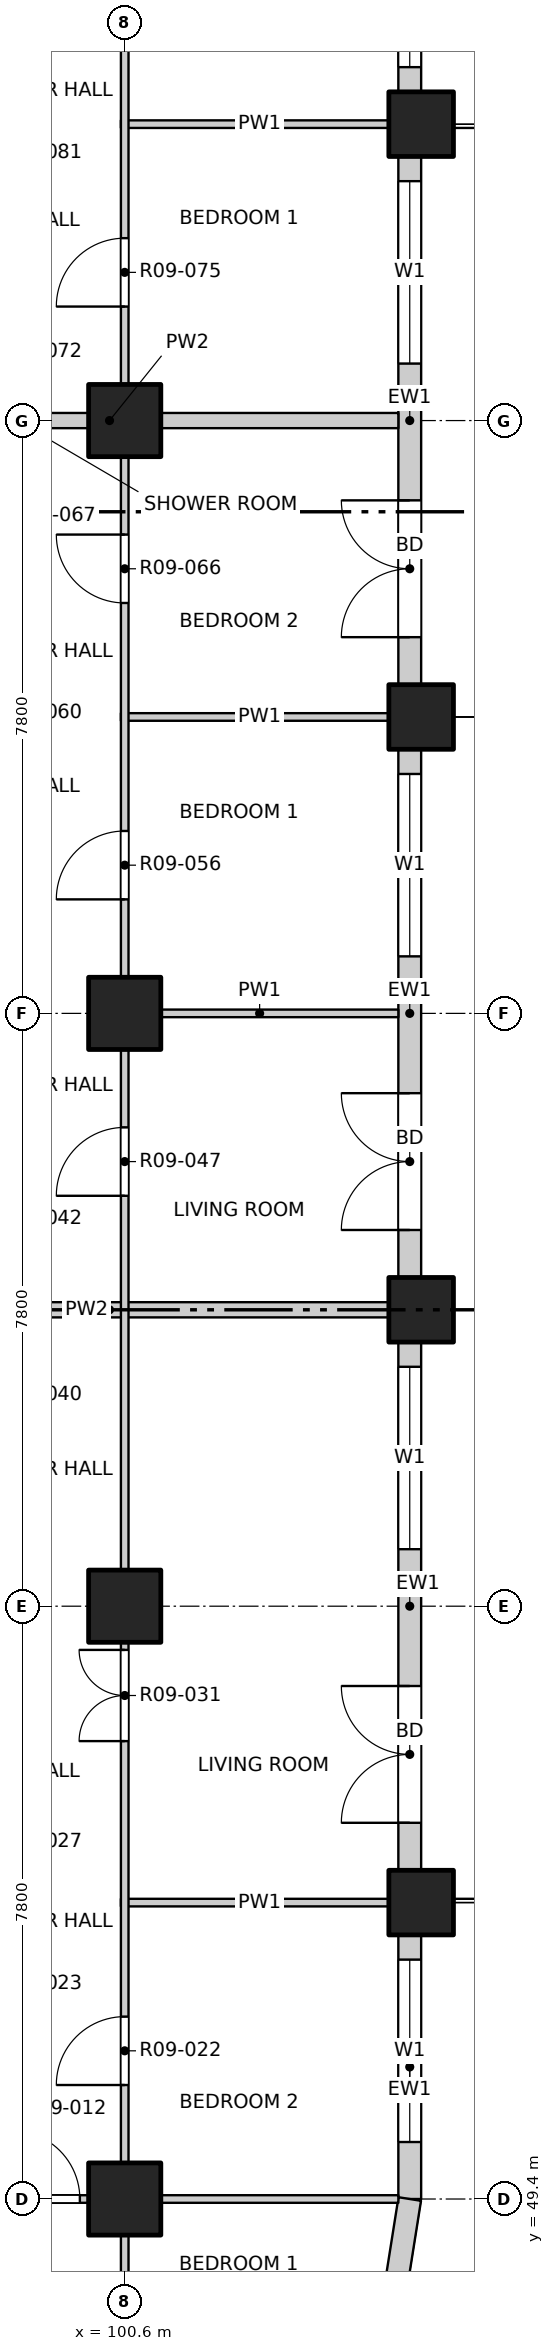
"""IFC4 building model, lengths in metres.
Left out: names, types, materials, properties, quantities, classifications, styles, units other than length and angle.
Written with IfcOpenShell. Run it as: python <this file> out.ifc"""

import sys

from ifc_helpers import new_model, si_unit, direction, frame, frame_2d, origin, origin_2d, place, context, subcontext, project, spatial, rectangle, extrude, element, fill, save


model = new_model("IFC4")
c1 = context("Model", 3, precision=1e-05, world=origin(), true_north=direction((0.0, 1.0)))
c2 = subcontext(c1, "Body", "Model", "MODEL_VIEW")
j1 = project(units=[si_unit("LENGTHUNIT", "METRE"), si_unit("PLANEANGLEUNIT", "RADIAN")], contexts=[c1])
p1 = place(None, origin())
s1 = spatial("IfcSite", under=j1, at=p1, CompositionType="ELEMENT")
p2 = place(p1, origin())
s2 = spatial("IfcBuilding", under=s1, at=p2, CompositionType="ELEMENT")
p3 = place(p2, frame((0.0, 0.0, 110.1)))
s3 = spatial("IfcBuildingStorey", under=s2, at=p3, CompositionType="ELEMENT", Elevation=110.1)
for number, where, z_axis, x_axis in (
    (1, (104.5, 53.3, -0.25), (0.0, 0.0, 1.0), (1.0, 0.0, 0.0)),
    (2, (104.5, 61.1, -0.25), (0.0, 0.0, 1.0), (1.0, 0.0, 0.0)),
    (3, (104.5, 68.9, -0.25), (0.0, 0.0, 1.0), (1.0, 0.0, 0.0)),
    (4, (104.5, 76.7, -0.25), (0.0, 0.0, 1.0), (1.0, 0.0, 0.0)),
):
    element("IfcColumn", number, at=place(p3, frame(where, z_axis=z_axis, x_axis=x_axis)), inside=s3, PredefinedType="COLUMN", context=c2, shape_type="SweptSolid", body=[
        extrude(rectangle(XDim=0.85, YDim=0.85, at=origin_2d()), origin(), (0.0, 0.0, 1.0), 3.4),
    ])
for number, where, z_axis, x_axis in (
    (5, (100.6, 49.4, -0.25), (0.0, 0.0, 1.0), (1.0, 0.0, 0.0)),
    (6, (100.6, 57.2, -0.25), (0.0, 0.0, 1.0), (1.0, 0.0, 0.0)),
    (7, (100.6, 65.0, -0.25), (0.0, 0.0, 1.0), (1.0, 0.0, 0.0)),
    (8, (100.6, 72.8, -0.25), (0.0, 0.0, 1.0), (1.0, 0.0, 0.0)),
):
    element("IfcColumn", number, at=place(p3, frame(where, z_axis=z_axis, x_axis=x_axis)), inside=s3, PredefinedType="COLUMN", context=c2, shape_type="SweptSolid", body=[
        extrude(rectangle(XDim=0.95, YDim=0.95, at=origin_2d()), origin(), (0.0, 0.0, 1.0), 3.4),
    ])
p4 = place(p3, frame((104.35, 49.4, 0.0), z_axis=(0.0, 0.0, 1.0), x_axis=(0.0, 1.0, 0.0)))
e9 = element("IfcWall", 9, at=p4, inside=s3, PredefinedType="SOLIDWALL", context=c2, shape_type="SweptSolid", body=[
    extrude(rectangle(XDim=3.475, YDim=0.3, at=frame_2d((1.738, 0.0))), origin(), (0.0, 0.0, 1.0), 2.7),
])
p5 = place(p4, frame((0.75, 0.0, 0.9)))
e10 = element("IfcOpeningElement", 10, at=p5, cuts=e9, PredefinedType="OPENING", context=c2, shape_type="SweptSolid", body=[
    extrude(rectangle(XDim=2.4, YDim=1.8, at=frame_2d((1.2, 0.9))), frame((0.0, 0.16, 0.0), z_axis=(0.0, -1.0, 0.0), x_axis=(1.0, 0.0, 0.0)), (0.0, 0.0, 1.0), 0.32),
])
p6 = place(p3, frame((104.35, 53.725, 0.0), z_axis=(0.0, 0.0, 1.0), x_axis=(0.0, 1.0, 0.0)))
e11 = element("IfcWall", 11, at=p6, inside=s3, PredefinedType="SOLIDWALL", context=c2, shape_type="SweptSolid", body=[
    extrude(rectangle(XDim=6.95, YDim=0.3, at=frame_2d((3.475, 0.0))), origin(), (0.0, 0.0, 1.0), 2.7),
])
p7 = place(p6, frame((0.625, 0.0, 0.0)))
e12 = element("IfcOpeningElement", 12, at=p7, cuts=e11, PredefinedType="OPENING", context=c2, shape_type="SweptSolid", body=[
    extrude(rectangle(XDim=1.8, YDim=2.4, at=frame_2d((0.9, 1.2))), frame((0.0, 0.16, 0.0), z_axis=(0.0, -1.0, 0.0), x_axis=(1.0, 0.0, 0.0)), (0.0, 0.0, 1.0), 0.32),
])
p8 = place(p6, frame((4.225, 0.0, 0.9)))
e13 = element("IfcOpeningElement", 13, at=p8, cuts=e11, PredefinedType="OPENING", context=c2, shape_type="SweptSolid", body=[
    extrude(rectangle(XDim=2.4, YDim=1.8, at=frame_2d((1.2, 0.9))), frame((0.0, 0.16, 0.0), z_axis=(0.0, -1.0, 0.0), x_axis=(1.0, 0.0, 0.0)), (0.0, 0.0, 1.0), 0.32),
])
p9 = place(p3, frame((104.35, 61.525, 0.0), z_axis=(0.0, 0.0, 1.0), x_axis=(0.0, 1.0, 0.0)))
e14 = element("IfcWall", 14, at=p9, inside=s3, PredefinedType="SOLIDWALL", context=c2, shape_type="SweptSolid", body=[
    extrude(rectangle(XDim=6.95, YDim=0.3, at=frame_2d((3.475, 0.0))), origin(), (0.0, 0.0, 1.0), 2.7),
])
p10 = place(p9, frame((0.625, 0.0, 0.0)))
e15 = element("IfcOpeningElement", 15, at=p10, cuts=e14, PredefinedType="OPENING", context=c2, shape_type="SweptSolid", body=[
    extrude(rectangle(XDim=1.8, YDim=2.4, at=frame_2d((0.9, 1.2))), frame((0.0, 0.16, 0.0), z_axis=(0.0, -1.0, 0.0), x_axis=(1.0, 0.0, 0.0)), (0.0, 0.0, 1.0), 0.32),
])
p11 = place(p9, frame((4.225, 0.0, 0.9)))
e16 = element("IfcOpeningElement", 16, at=p11, cuts=e14, PredefinedType="OPENING", context=c2, shape_type="SweptSolid", body=[
    extrude(rectangle(XDim=2.4, YDim=1.8, at=frame_2d((1.2, 0.9))), frame((0.0, 0.16, 0.0), z_axis=(0.0, -1.0, 0.0), x_axis=(1.0, 0.0, 0.0)), (0.0, 0.0, 1.0), 0.32),
])
p12 = place(p3, frame((104.35, 69.325, 0.0), z_axis=(0.0, 0.0, 1.0), x_axis=(0.0, 1.0, 0.0)))
e17 = element("IfcWall", 17, at=p12, inside=s3, PredefinedType="SOLIDWALL", context=c2, shape_type="SweptSolid", body=[
    extrude(rectangle(XDim=6.95, YDim=0.3, at=frame_2d((3.475, 0.0))), origin(), (0.0, 0.0, 1.0), 2.7),
])
p13 = place(p12, frame((0.625, 0.0, 0.0)))
e18 = element("IfcOpeningElement", 18, at=p13, cuts=e17, PredefinedType="OPENING", context=c2, shape_type="SweptSolid", body=[
    extrude(rectangle(XDim=1.8, YDim=2.4, at=frame_2d((0.9, 1.2))), frame((0.0, 0.16, 0.0), z_axis=(0.0, -1.0, 0.0), x_axis=(1.0, 0.0, 0.0)), (0.0, 0.0, 1.0), 0.32),
])
p14 = place(p12, frame((4.225, 0.0, 0.9)))
e19 = element("IfcOpeningElement", 19, at=p14, cuts=e17, PredefinedType="OPENING", context=c2, shape_type="SweptSolid", body=[
    extrude(rectangle(XDim=2.4, YDim=1.8, at=frame_2d((1.2, 0.9))), frame((0.0, 0.16, 0.0), z_axis=(0.0, -1.0, 0.0), x_axis=(1.0, 0.0, 0.0)), (0.0, 0.0, 1.0), 0.32),
])
p15 = place(p3, frame((104.35, 77.125, 0.0), z_axis=(0.0, 0.0, 1.0), x_axis=(0.0, 1.0, 0.0)))
e20 = element("IfcWall", 20, at=p15, inside=s3, PredefinedType="SOLIDWALL", context=c2, shape_type="SweptSolid", body=[
    extrude(rectangle(XDim=3.475, YDim=0.3, at=frame_2d((1.738, 0.0))), origin(), (0.0, 0.0, 1.0), 2.7),
])
p16 = place(p15, frame((0.325, 0.0, 0.9)))
e21 = element("IfcOpeningElement", 21, at=p16, cuts=e20, PredefinedType="OPENING", context=c2, shape_type="SweptSolid", body=[
    extrude(rectangle(XDim=2.4, YDim=1.8, at=frame_2d((1.2, 0.9))), frame((0.0, 0.16, 0.0), z_axis=(0.0, -1.0, 0.0), x_axis=(1.0, 0.0, 0.0)), (0.0, 0.0, 1.0), 0.32),
])
p17 = place(p3, frame((104.167, 48.241, 0.0), z_axis=(0.0, 0.0, 1.0), x_axis=(0.156496880861, 0.987678452879, 0.0)))
e22 = element("IfcWall", 22, at=p17, inside=s3, PredefinedType="SOLIDWALL", context=c2, shape_type="SweptSolid", body=[
    extrude(rectangle(XDim=1.173, YDim=0.3, at=frame_2d((0.586, 0.0))), origin(), (0.0, 0.0, 1.0), 2.7),
])
p18 = place(p3, frame((65.8, 49.4, 0.0), z_axis=(0.0, 0.0, 1.0), x_axis=(1.0, 0.0, 0.0)))
e23 = element("IfcWall", 23, at=p18, inside=s3, PredefinedType="PARTITIONING", context=c2, shape_type="SweptSolid", body=[
    extrude(rectangle(XDim=38.4, YDim=0.1, at=frame_2d((19.2, 0.0))), origin(), (0.0, 0.0, 1.0), 3.15),
])
p19 = place(p18, frame((4.19, 0.0, 0.0)))
e24 = element("IfcOpeningElement", 24, at=p19, cuts=e23, PredefinedType="OPENING", context=c2, shape_type="SweptSolid", body=[
    extrude(rectangle(XDim=0.9, YDim=2.1, at=frame_2d((0.45, 1.05))), frame((0.0, 0.06, 0.0), z_axis=(0.0, -1.0, 0.0), x_axis=(1.0, 0.0, 0.0)), (0.0, 0.0, 1.0), 0.12),
])
p20 = place(p18, frame((9.0, 0.0, 0.0)))
e25 = element("IfcOpeningElement", 25, at=p20, cuts=e23, PredefinedType="OPENING", context=c2, shape_type="SweptSolid", body=[
    extrude(rectangle(XDim=0.9, YDim=2.1, at=frame_2d((0.45, 1.05))), frame((0.0, 0.06, 0.0), z_axis=(0.0, -1.0, 0.0), x_axis=(1.0, 0.0, 0.0)), (0.0, 0.0, 1.0), 0.12),
])
p21 = place(p18, frame((12.9, 0.0, 0.0)))
e26 = element("IfcOpeningElement", 26, at=p21, cuts=e23, PredefinedType="OPENING", context=c2, shape_type="SweptSolid", body=[
    extrude(rectangle(XDim=0.9, YDim=2.1, at=frame_2d((0.45, 1.05))), frame((0.0, 0.06, 0.0), z_axis=(0.0, -1.0, 0.0), x_axis=(1.0, 0.0, 0.0)), (0.0, 0.0, 1.0), 0.12),
])
p22 = place(p18, frame((16.8, 0.0, 0.0)))
e27 = element("IfcOpeningElement", 27, at=p22, cuts=e23, PredefinedType="OPENING", context=c2, shape_type="SweptSolid", body=[
    extrude(rectangle(XDim=0.9, YDim=2.1, at=frame_2d((0.45, 1.05))), frame((0.0, 0.06, 0.0), z_axis=(0.0, -1.0, 0.0), x_axis=(1.0, 0.0, 0.0)), (0.0, 0.0, 1.0), 0.12),
])
p23 = place(p18, frame((20.7, 0.0, 0.0)))
e28 = element("IfcOpeningElement", 28, at=p23, cuts=e23, PredefinedType="OPENING", context=c2, shape_type="SweptSolid", body=[
    extrude(rectangle(XDim=0.9, YDim=2.1, at=frame_2d((0.45, 1.05))), frame((0.0, 0.06, 0.0), z_axis=(0.0, -1.0, 0.0), x_axis=(1.0, 0.0, 0.0)), (0.0, 0.0, 1.0), 0.12),
])
p24 = place(p18, frame((24.6, 0.0, 0.0)))
e29 = element("IfcOpeningElement", 29, at=p24, cuts=e23, PredefinedType="OPENING", context=c2, shape_type="SweptSolid", body=[
    extrude(rectangle(XDim=0.9, YDim=2.1, at=frame_2d((0.45, 1.05))), frame((0.0, 0.06, 0.0), z_axis=(0.0, -1.0, 0.0), x_axis=(1.0, 0.0, 0.0)), (0.0, 0.0, 1.0), 0.12),
])
p25 = place(p18, frame((28.5, 0.0, 0.0)))
e30 = element("IfcOpeningElement", 30, at=p25, cuts=e23, PredefinedType="OPENING", context=c2, shape_type="SweptSolid", body=[
    extrude(rectangle(XDim=0.9, YDim=2.1, at=frame_2d((0.45, 1.05))), frame((0.0, 0.06, 0.0), z_axis=(0.0, -1.0, 0.0), x_axis=(1.0, 0.0, 0.0)), (0.0, 0.0, 1.0), 0.12),
])
p26 = place(p18, frame((33.31, 0.0, 0.0)))
e31 = element("IfcOpeningElement", 31, at=p26, cuts=e23, PredefinedType="OPENING", context=c2, shape_type="SweptSolid", body=[
    extrude(rectangle(XDim=0.9, YDim=2.1, at=frame_2d((0.45, 1.05))), frame((0.0, 0.06, 0.0), z_axis=(0.0, -1.0, 0.0), x_axis=(1.0, 0.0, 0.0)), (0.0, 0.0, 1.0), 0.12),
])
p27 = place(p3, frame((100.55, 53.3, 0.0), z_axis=(0.0, 0.0, 1.0), x_axis=(1.0, 0.0, 0.0)))
e32 = element("IfcWall", 32, at=p27, inside=s3, PredefinedType="PARTITIONING", context=c2, shape_type="SweptSolid", body=[
    extrude(rectangle(XDim=3.65, YDim=0.1, at=frame_2d((1.825, 0.0))), origin(), (0.0, 0.0, 1.0), 3.15),
])
p28 = place(p3, frame((96.6, 61.1, 0.0), z_axis=(0.0, 0.0, 1.0), x_axis=(1.0, 0.0, 0.0)))
e33 = element("IfcWall", 33, at=p28, inside=s3, PredefinedType="PARTITIONING", context=c2, shape_type="SweptSolid", body=[
    extrude(rectangle(XDim=7.6, YDim=0.2, at=frame_2d((3.8, 0.0))), origin(), (0.0, 0.0, 1.0), 2.55),
])
p29 = place(p3, frame((100.55, 65.0, 0.0), z_axis=(0.0, 0.0, 1.0), x_axis=(1.0, 0.0, 0.0)))
e34 = element("IfcWall", 34, at=p29, inside=s3, PredefinedType="PARTITIONING", context=c2, shape_type="SweptSolid", body=[
    extrude(rectangle(XDim=3.65, YDim=0.1, at=frame_2d((1.825, 0.0))), origin(), (0.0, 0.0, 1.0), 3.15),
])
p30 = place(p3, frame((100.55, 68.9, 0.0), z_axis=(0.0, 0.0, 1.0), x_axis=(1.0, 0.0, 0.0)))
e35 = element("IfcWall", 35, at=p30, inside=s3, PredefinedType="PARTITIONING", context=c2, shape_type="SweptSolid", body=[
    extrude(rectangle(XDim=3.65, YDim=0.1, at=frame_2d((1.825, 0.0))), origin(), (0.0, 0.0, 1.0), 2.55),
])
p31 = place(p3, frame((96.6, 72.8, 0.0), z_axis=(0.0, 0.0, 1.0), x_axis=(1.0, 0.0, 0.0)))
e36 = element("IfcWall", 36, at=p31, inside=s3, PredefinedType="PARTITIONING", context=c2, shape_type="SweptSolid", body=[
    extrude(rectangle(XDim=7.6, YDim=0.2, at=frame_2d((3.8, 0.0))), origin(), (0.0, 0.0, 1.0), 3.15),
])
p32 = place(p3, frame((100.55, 76.7, 0.0), z_axis=(0.0, 0.0, 1.0), x_axis=(1.0, 0.0, 0.0)))
e37 = element("IfcWall", 37, at=p32, inside=s3, PredefinedType="PARTITIONING", context=c2, shape_type="SweptSolid", body=[
    extrude(rectangle(XDim=3.65, YDim=0.1, at=frame_2d((1.825, 0.0))), origin(), (0.0, 0.0, 1.0), 2.55),
])
p33 = place(p3, frame((100.6, 45.8, 0.0), z_axis=(0.0, 0.0, 1.0), x_axis=(0.0, 1.0, 0.0)))
e38 = element("IfcWall", 38, at=p33, inside=s3, PredefinedType="PARTITIONING", context=c2, shape_type="SweptSolid", body=[
    extrude(rectangle(XDim=38.4, YDim=0.1, at=frame_2d((19.2, 0.0))), origin(), (0.0, 0.0, 1.0), 3.15),
])
p34 = place(p33, frame((1.05, 0.0, 0.0)))
e39 = element("IfcOpeningElement", 39, at=p34, cuts=e38, PredefinedType="OPENING", context=c2, shape_type="SweptSolid", body=[
    extrude(rectangle(XDim=1.2, YDim=2.1, at=frame_2d((0.6, 1.05))), frame((0.0, 0.06, 0.0), z_axis=(0.0, -1.0, 0.0), x_axis=(1.0, 0.0, 0.0)), (0.0, 0.0, 1.0), 0.12),
])
p35 = place(p33, frame((5.1, 0.0, 0.0)))
e40 = element("IfcOpeningElement", 40, at=p35, cuts=e38, PredefinedType="OPENING", context=c2, shape_type="SweptSolid", body=[
    extrude(rectangle(XDim=0.9, YDim=2.1, at=frame_2d((0.45, 1.05))), frame((0.0, 0.06, 0.0), z_axis=(0.0, -1.0, 0.0), x_axis=(1.0, 0.0, 0.0)), (0.0, 0.0, 1.0), 0.12),
])
p36 = place(p33, frame((9.625, 0.0, 0.0)))
e41 = element("IfcOpeningElement", 41, at=p36, cuts=e38, PredefinedType="OPENING", context=c2, shape_type="SweptSolid", body=[
    extrude(rectangle(XDim=1.2, YDim=2.1, at=frame_2d((0.6, 1.05))), frame((0.0, 0.06, 0.0), z_axis=(0.0, -1.0, 0.0), x_axis=(1.0, 0.0, 0.0)), (0.0, 0.0, 1.0), 0.12),
])
p37 = place(p33, frame((16.8, 0.0, 0.0)))
e42 = element("IfcOpeningElement", 42, at=p37, cuts=e38, PredefinedType="OPENING", context=c2, shape_type="SweptSolid", body=[
    extrude(rectangle(XDim=0.9, YDim=2.1, at=frame_2d((0.45, 1.05))), frame((0.0, 0.06, 0.0), z_axis=(0.0, -1.0, 0.0), x_axis=(1.0, 0.0, 0.0)), (0.0, 0.0, 1.0), 0.12),
])
p38 = place(p33, frame((20.7, 0.0, 0.0)))
e43 = element("IfcOpeningElement", 43, at=p38, cuts=e38, PredefinedType="OPENING", context=c2, shape_type="SweptSolid", body=[
    extrude(rectangle(XDim=0.9, YDim=2.1, at=frame_2d((0.45, 1.05))), frame((0.0, 0.06, 0.0), z_axis=(0.0, -1.0, 0.0), x_axis=(1.0, 0.0, 0.0)), (0.0, 0.0, 1.0), 0.12),
])
p39 = place(p33, frame((24.6, 0.0, 0.0)))
e44 = element("IfcOpeningElement", 44, at=p39, cuts=e38, PredefinedType="OPENING", context=c2, shape_type="SweptSolid", body=[
    extrude(rectangle(XDim=0.9, YDim=2.1, at=frame_2d((0.45, 1.05))), frame((0.0, 0.06, 0.0), z_axis=(0.0, -1.0, 0.0), x_axis=(1.0, 0.0, 0.0)), (0.0, 0.0, 1.0), 0.12),
])
p40 = place(p33, frame((28.5, 0.0, 0.0)))
e45 = element("IfcOpeningElement", 45, at=p40, cuts=e38, PredefinedType="OPENING", context=c2, shape_type="SweptSolid", body=[
    extrude(rectangle(XDim=0.9, YDim=2.1, at=frame_2d((0.45, 1.05))), frame((0.0, 0.06, 0.0), z_axis=(0.0, -1.0, 0.0), x_axis=(1.0, 0.0, 0.0)), (0.0, 0.0, 1.0), 0.12),
])
p41 = place(p33, frame((32.4, 0.0, 0.0)))
e46 = element("IfcOpeningElement", 46, at=p41, cuts=e38, PredefinedType="OPENING", context=c2, shape_type="SweptSolid", body=[
    extrude(rectangle(XDim=0.9, YDim=2.1, at=frame_2d((0.45, 1.05))), frame((0.0, 0.06, 0.0), z_axis=(0.0, -1.0, 0.0), x_axis=(1.0, 0.0, 0.0)), (0.0, 0.0, 1.0), 0.12),
])
p42 = place(p33, frame((36.15, 0.0, 0.0)))
e47 = element("IfcOpeningElement", 47, at=p42, cuts=e38, PredefinedType="OPENING", context=c2, shape_type="SweptSolid", body=[
    extrude(rectangle(XDim=1.2, YDim=2.1, at=frame_2d((0.6, 1.05))), frame((0.0, 0.06, 0.0), z_axis=(0.0, -1.0, 0.0), x_axis=(1.0, 0.0, 0.0)), (0.0, 0.0, 1.0), 0.12),
])
p43 = place(p5, origin())
e48 = element("IfcWindow", 48, at=p43, inside=s3, PartitioningType="DOUBLE_PANEL_VERTICAL", PredefinedType="WINDOW", context=c2, shape_type="SweptSolid", body=[
    extrude(rectangle(XDim=2.4, YDim=1.8, at=frame_2d((1.2, 0.9))), frame((0.0, 0.03, 0.0), z_axis=(0.0, -1.0, 0.0), x_axis=(1.0, 0.0, 0.0)), (0.0, 0.0, 1.0), 0.06),
])
fill(e10, e48)
p44 = place(p7, origin())
e49 = element("IfcDoor", 49, at=p44, inside=s3, OperationType="DOUBLE_DOOR_SINGLE_SWING", PredefinedType="DOOR", context=c2, shape_type="SweptSolid", body=[
    extrude(rectangle(XDim=1.8, YDim=2.4, at=frame_2d((0.9, 1.2))), frame((0.0, 0.025, 0.0), z_axis=(0.0, -1.0, 0.0), x_axis=(1.0, 0.0, 0.0)), (0.0, 0.0, 1.0), 0.05),
])
fill(e12, e49)
p45 = place(p8, origin())
e50 = element("IfcWindow", 50, at=p45, inside=s3, PartitioningType="DOUBLE_PANEL_VERTICAL", PredefinedType="WINDOW", context=c2, shape_type="SweptSolid", body=[
    extrude(rectangle(XDim=2.4, YDim=1.8, at=frame_2d((1.2, 0.9))), frame((0.0, 0.03, 0.0), z_axis=(0.0, -1.0, 0.0), x_axis=(1.0, 0.0, 0.0)), (0.0, 0.0, 1.0), 0.06),
])
fill(e13, e50)
p46 = place(p10, origin())
e51 = element("IfcDoor", 51, at=p46, inside=s3, OperationType="DOUBLE_DOOR_SINGLE_SWING", PredefinedType="DOOR", context=c2, shape_type="SweptSolid", body=[
    extrude(rectangle(XDim=1.8, YDim=2.4, at=frame_2d((0.9, 1.2))), frame((0.0, 0.025, 0.0), z_axis=(0.0, -1.0, 0.0), x_axis=(1.0, 0.0, 0.0)), (0.0, 0.0, 1.0), 0.05),
])
fill(e15, e51)
p47 = place(p11, origin())
e52 = element("IfcWindow", 52, at=p47, inside=s3, PartitioningType="DOUBLE_PANEL_VERTICAL", PredefinedType="WINDOW", context=c2, shape_type="SweptSolid", body=[
    extrude(rectangle(XDim=2.4, YDim=1.8, at=frame_2d((1.2, 0.9))), frame((0.0, 0.03, 0.0), z_axis=(0.0, -1.0, 0.0), x_axis=(1.0, 0.0, 0.0)), (0.0, 0.0, 1.0), 0.06),
])
fill(e16, e52)
p48 = place(p13, origin())
e53 = element("IfcDoor", 53, at=p48, inside=s3, OperationType="DOUBLE_DOOR_SINGLE_SWING", PredefinedType="DOOR", context=c2, shape_type="SweptSolid", body=[
    extrude(rectangle(XDim=1.8, YDim=2.4, at=frame_2d((0.9, 1.2))), frame((0.0, 0.025, 0.0), z_axis=(0.0, -1.0, 0.0), x_axis=(1.0, 0.0, 0.0)), (0.0, 0.0, 1.0), 0.05),
])
fill(e18, e53)
p49 = place(p14, origin())
e54 = element("IfcWindow", 54, at=p49, inside=s3, PartitioningType="DOUBLE_PANEL_VERTICAL", PredefinedType="WINDOW", context=c2, shape_type="SweptSolid", body=[
    extrude(rectangle(XDim=2.4, YDim=1.8, at=frame_2d((1.2, 0.9))), frame((0.0, 0.03, 0.0), z_axis=(0.0, -1.0, 0.0), x_axis=(1.0, 0.0, 0.0)), (0.0, 0.0, 1.0), 0.06),
])
fill(e19, e54)
p50 = place(p16, origin())
e55 = element("IfcWindow", 55, at=p50, inside=s3, PartitioningType="DOUBLE_PANEL_VERTICAL", PredefinedType="WINDOW", context=c2, shape_type="SweptSolid", body=[
    extrude(rectangle(XDim=2.4, YDim=1.8, at=frame_2d((1.2, 0.9))), frame((0.0, 0.03, 0.0), z_axis=(0.0, -1.0, 0.0), x_axis=(1.0, 0.0, 0.0)), (0.0, 0.0, 1.0), 0.06),
])
fill(e21, e55)
p51 = place(p26, origin())
e56 = element("IfcDoor", 56, at=p51, inside=s3, OperationType="SINGLE_SWING_LEFT", PredefinedType="DOOR", context=c2, shape_type="SweptSolid", body=[
    extrude(rectangle(XDim=0.9, YDim=2.1, at=frame_2d((0.45, 1.05))), frame((0.0, 0.025, 0.0), z_axis=(0.0, -1.0, 0.0), x_axis=(1.0, 0.0, 0.0)), (0.0, 0.0, 1.0), 0.05),
])
fill(e31, e56)
p52 = place(p35, origin())
e57 = element("IfcDoor", 57, at=p52, inside=s3, OperationType="SINGLE_SWING_LEFT", PredefinedType="DOOR", context=c2, shape_type="SweptSolid", body=[
    extrude(rectangle(XDim=0.9, YDim=2.1, at=frame_2d((0.45, 1.05))), frame((0.0, 0.025, 0.0), z_axis=(0.0, -1.0, 0.0), x_axis=(1.0, 0.0, 0.0)), (0.0, 0.0, 1.0), 0.05),
])
fill(e40, e57)
p53 = place(p36, origin())
e58 = element("IfcDoor", 58, at=p53, inside=s3, OperationType="DOUBLE_DOOR_SINGLE_SWING", PredefinedType="DOOR", context=c2, shape_type="SweptSolid", body=[
    extrude(rectangle(XDim=1.2, YDim=2.1, at=frame_2d((0.6, 1.05))), frame((0.0, 0.025, 0.0), z_axis=(0.0, -1.0, 0.0), x_axis=(1.0, 0.0, 0.0)), (0.0, 0.0, 1.0), 0.05),
])
fill(e41, e58)
p54 = place(p37, origin())
e59 = element("IfcDoor", 59, at=p54, inside=s3, OperationType="SINGLE_SWING_LEFT", PredefinedType="DOOR", context=c2, shape_type="SweptSolid", body=[
    extrude(rectangle(XDim=0.9, YDim=2.1, at=frame_2d((0.45, 1.05))), frame((0.0, 0.025, 0.0), z_axis=(0.0, -1.0, 0.0), x_axis=(1.0, 0.0, 0.0)), (0.0, 0.0, 1.0), 0.05),
])
fill(e42, e59)
p55 = place(p38, origin())
e60 = element("IfcDoor", 60, at=p55, inside=s3, OperationType="SINGLE_SWING_LEFT", PredefinedType="DOOR", context=c2, shape_type="SweptSolid", body=[
    extrude(rectangle(XDim=0.9, YDim=2.1, at=frame_2d((0.45, 1.05))), frame((0.0, 0.025, 0.0), z_axis=(0.0, -1.0, 0.0), x_axis=(1.0, 0.0, 0.0)), (0.0, 0.0, 1.0), 0.05),
])
fill(e43, e60)
p56 = place(p39, origin())
e61 = element("IfcDoor", 61, at=p56, inside=s3, OperationType="SINGLE_SWING_RIGHT", PredefinedType="DOOR", context=c2, shape_type="SweptSolid", body=[
    extrude(rectangle(XDim=0.9, YDim=2.1, at=frame_2d((0.45, 1.05))), frame((0.0, 0.025, 0.0), z_axis=(0.0, -1.0, 0.0), x_axis=(1.0, 0.0, 0.0)), (0.0, 0.0, 1.0), 0.05),
])
fill(e44, e61)
p57 = place(p40, origin())
e62 = element("IfcDoor", 62, at=p57, inside=s3, OperationType="SINGLE_SWING_LEFT", PredefinedType="DOOR", context=c2, shape_type="SweptSolid", body=[
    extrude(rectangle(XDim=0.9, YDim=2.1, at=frame_2d((0.45, 1.05))), frame((0.0, 0.025, 0.0), z_axis=(0.0, -1.0, 0.0), x_axis=(1.0, 0.0, 0.0)), (0.0, 0.0, 1.0), 0.05),
])
fill(e45, e62)
save(model, sys.argv[1])
